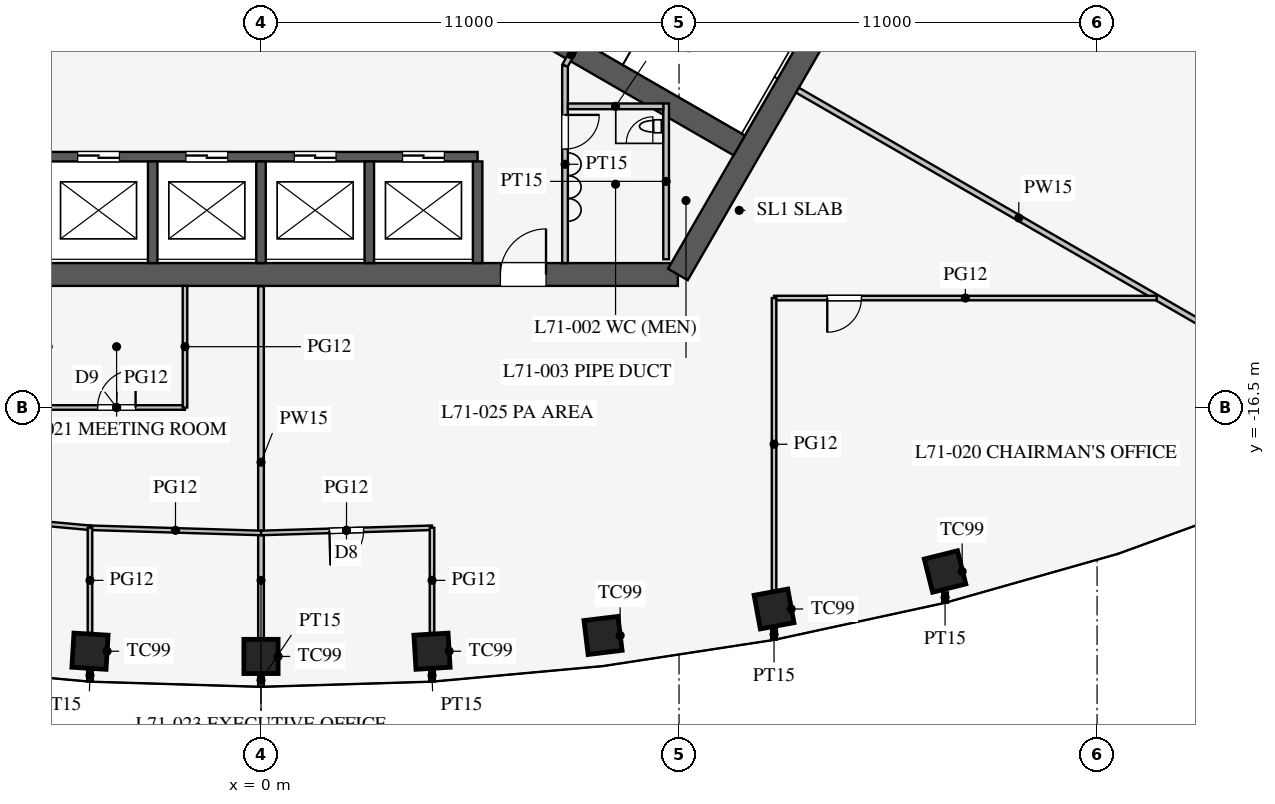
"""IFC4 building model, lengths in metres.
Left out: names, types, materials, properties, quantities, classifications, styles, units other than length and angle.
Written with IfcOpenShell. Run it as: python <this file> out.ifc"""

import sys

from ifc_helpers import new_model, si_unit, direction, frame, frame_2d, origin, origin_2d, place, context, subcontext, project, spatial, rectangle, extrude, element, fill, save


model = new_model("IFC4")
c1 = context("Model", 3, precision=1e-05, world=origin(), true_north=direction((0.0, 1.0)))
c2 = subcontext(c1, "Body", "Model", "MODEL_VIEW")
j1 = project(units=[si_unit("LENGTHUNIT", "METRE"), si_unit("PLANEANGLEUNIT", "RADIAN")], contexts=[c1])
p1 = place(None, origin())
s1 = spatial("IfcSite", under=j1, at=p1, CompositionType="ELEMENT")
p2 = place(p1, origin())
s2 = spatial("IfcBuilding", under=s1, at=p2, CompositionType="ELEMENT")
p3 = place(p2, frame((0.0, 0.0, 309.9)))
s3 = spatial("IfcBuildingStorey", under=s2, at=p3, CompositionType="ELEMENT", Elevation=309.9)
for number, where, z_axis, x_axis in (
    (1, (-4.5, -22.914, 0.0), (0.0, 0.0, 1.0), (0.998, -0.061, 0.0)),
    (2, (0.0, -23.052, 0.0), (0.0, 0.0, 1.0), (1.0, 0.0, 0.0)),
    (3, (4.5, -22.914, 0.0), (0.0, 0.0, 1.0), (0.998, 0.061, 0.0)),
    (4, (9.0, -22.499, 0.0), (0.0, 0.0, 1.0), (0.993, 0.121, 0.0)),
    (5, (13.5, -21.803, 0.0), (0.0, 0.0, 1.0), (0.983, 0.182, 0.0)),
    (6, (18.0, -20.816, 0.0), (0.0, 0.0, 1.0), (0.97, 0.242, 0.0)),
):
    element("IfcColumn", number, at=place(p3, frame(where, z_axis=z_axis, x_axis=x_axis)), inside=s3, PredefinedType="COLUMN", context=c2, shape_type="SweptSolid", body=[
        extrude(rectangle(XDim=0.9, YDim=0.9, at=origin_2d()), origin(), (0.0, 0.0, 1.0), 4.2),
    ])
p4 = place(p3, frame((-10.97, -13.0, 0.0), z_axis=(0.0, 0.0, 1.0), x_axis=(1.0, 0.0, 0.0)))
e7 = element("IfcWall", 7, at=p4, inside=s3, PredefinedType="SHEAR", context=c2, shape_type="SweptSolid", body=[
    extrude(rectangle(XDim=21.939, YDim=0.6, at=frame_2d((10.97, 0.0))), origin(), (0.0, 0.0, 1.0), 4.2),
])
p5 = place(p4, frame((17.27, 0.0, 0.0)))
e8 = element("IfcOpeningElement", 8, at=p5, cuts=e7, PredefinedType="OPENING", context=c2, shape_type="SweptSolid", body=[
    extrude(rectangle(XDim=1.2, YDim=2.1, at=frame_2d((0.6, 1.05))), frame((0.0, 0.31, 0.0), z_axis=(0.0, -1.0, 0.0), x_axis=(1.0, 0.0, 0.0)), (0.0, 0.0, 1.0), 0.62),
])
p6 = place(p4, frame((3.47, 0.0, 0.0)))
e9 = element("IfcOpeningElement", 9, at=p6, cuts=e7, PredefinedType="OPENING", context=c2, shape_type="SweptSolid", body=[
    extrude(rectangle(XDim=1.2, YDim=2.1, at=frame_2d((0.6, 1.05))), frame((0.0, 0.31, 0.0), z_axis=(0.0, -1.0, 0.0), x_axis=(1.0, 0.0, 0.0)), (0.0, 0.0, 1.0), 0.62),
])
p7 = place(p3, frame((10.97, -13.0, 0.0), z_axis=(0.0, 0.0, 1.0), x_axis=(0.499995765644, 0.866027848477, 0.0)))
e10 = element("IfcWall", 10, at=p7, inside=s3, PredefinedType="SHEAR", context=c2, shape_type="SweptSolid", body=[
    extrude(rectangle(XDim=11.547, YDim=0.6, at=frame_2d((5.773, 0.0))), origin(), (0.0, 0.0, 1.0), 4.2),
])
p8 = place(p3, frame((-5.7, -9.9, 0.0), z_axis=(0.0, 0.0, 1.0), x_axis=(1.0, 0.0, 0.0)))
e11 = element("IfcWall", 11, at=p8, inside=s3, PredefinedType="SHEAR", context=c2, shape_type="SweptSolid", body=[
    extrude(rectangle(XDim=11.4, YDim=0.25, at=frame_2d((5.7, 0.0))), origin(), (0.0, 0.0, 1.0), 4.2),
])
p9 = place(p8, frame((0.875, 0.0, 0.0)))
e12 = element("IfcOpeningElement", 12, at=p9, cuts=e11, PredefinedType="OPENING", context=c2, shape_type="SweptSolid", body=[
    extrude(rectangle(XDim=1.1, YDim=2.2, at=frame_2d((0.55, 1.1))), frame((0.0, 0.135, 0.0), z_axis=(0.0, -1.0, 0.0), x_axis=(1.0, 0.0, 0.0)), (0.0, 0.0, 1.0), 0.27),
])
p10 = place(p8, frame((3.725, 0.0, 0.0)))
e13 = element("IfcOpeningElement", 13, at=p10, cuts=e11, PredefinedType="OPENING", context=c2, shape_type="SweptSolid", body=[
    extrude(rectangle(XDim=1.1, YDim=2.2, at=frame_2d((0.55, 1.1))), frame((0.0, 0.135, 0.0), z_axis=(0.0, -1.0, 0.0), x_axis=(1.0, 0.0, 0.0)), (0.0, 0.0, 1.0), 0.27),
])
p11 = place(p8, frame((6.575, 0.0, 0.0)))
e14 = element("IfcOpeningElement", 14, at=p11, cuts=e11, PredefinedType="OPENING", context=c2, shape_type="SweptSolid", body=[
    extrude(rectangle(XDim=1.1, YDim=2.2, at=frame_2d((0.55, 1.1))), frame((0.0, 0.135, 0.0), z_axis=(0.0, -1.0, 0.0), x_axis=(1.0, 0.0, 0.0)), (0.0, 0.0, 1.0), 0.27),
])
p12 = place(p8, frame((9.425, 0.0, 0.0)))
e15 = element("IfcOpeningElement", 15, at=p12, cuts=e11, PredefinedType="OPENING", context=c2, shape_type="SweptSolid", body=[
    extrude(rectangle(XDim=1.1, YDim=2.2, at=frame_2d((0.55, 1.1))), frame((0.0, 0.135, 0.0), z_axis=(0.0, -1.0, 0.0), x_axis=(1.0, 0.0, 0.0)), (0.0, 0.0, 1.0), 0.27),
])
for number, where, z_axis, x_axis in (
    (16, (-2.85, -10.025, 0.0), (0.0, 0.0, 1.0), (0.0, -1.0, 0.0)),
    (17, (0.0, -10.025, 0.0), (0.0, 0.0, 1.0), (0.0, -1.0, 0.0)),
    (18, (2.85, -10.025, 0.0), (0.0, 0.0, 1.0), (0.0, -1.0, 0.0)),
    (19, (5.7, -10.025, 0.0), (0.0, 0.0, 1.0), (0.0, -1.0, 0.0)),
):
    element("IfcWall", number, at=place(p3, frame(where, z_axis=z_axis, x_axis=x_axis)), inside=s3, PredefinedType="SHEAR", context=c2, shape_type="SweptSolid", body=[
        extrude(rectangle(XDim=2.675, YDim=0.25, at=frame_2d((1.337, 0.0))), origin(), (0.0, 0.0, 1.0), 4.2),
    ])
for number, where, z_axis, x_axis in (
    (20, (4.638, -5.016, 0.0), (0.0, 0.0, 1.0), (0.866, -0.5, 0.0)),
    (21, (-4.638, -5.016, 0.0), (0.0, 0.0, 1.0), (-0.866, -0.5, 0.0)),
):
    element("IfcWall", number, at=place(p3, frame(where, z_axis=z_axis, x_axis=x_axis)), inside=s3, PredefinedType="SHEAR", context=c2, shape_type="SweptSolid", body=[
        extrude(rectangle(XDim=9.175, YDim=0.6, at=frame_2d((4.587, 0.0))), origin(), (0.0, 0.0, 1.0), 4.2),
    ])
p13 = place(p3, frame((8.0, -7.5, 0.0), z_axis=(0.0, 0.0, 1.0), x_axis=(0.0, -1.0, 0.0)))
e22 = element("IfcWall", 22, at=p13, inside=s3, PredefinedType="PARTITIONING", context=c2, shape_type="SweptSolid", body=[
    extrude(rectangle(XDim=5.2, YDim=0.15, at=frame_2d((2.6, 0.0))), origin(), (0.0, 0.0, 1.0), 4.0),
])
p14 = place(p13, frame((1.3, 0.0, 0.0)))
e23 = element("IfcOpeningElement", 23, at=p14, cuts=e22, PredefinedType="OPENING", context=c2, shape_type="SweptSolid", body=[
    extrude(rectangle(XDim=0.9, YDim=2.1, at=frame_2d((0.45, 1.05))), frame((0.0, 0.085, 0.0), z_axis=(0.0, -1.0, 0.0), x_axis=(1.0, 0.0, 0.0)), (0.0, 0.0, 1.0), 0.17),
])
p15 = place(p3, frame((8.0, -7.5, 0.0), z_axis=(0.0, 0.0, 1.0), x_axis=(0.499842556608, 0.866116284689, 0.0)))
e24 = element("IfcWall", 24, at=p15, inside=s3, PredefinedType="PARTITIONING", context=c2, shape_type="SweptSolid", body=[
    extrude(rectangle(XDim=0.645, YDim=0.15, at=frame_2d((0.323, 0.0))), origin(), (0.0, 0.0, 1.0), 4.0),
])
p16 = place(p3, frame((10.66, -8.5, 0.0), z_axis=(0.0, 0.0, 1.0), x_axis=(0.0, -1.0, 0.0)))
e25 = element("IfcWall", 25, at=p16, inside=s3, PredefinedType="PARTITIONING", context=c2, shape_type="SweptSolid", body=[
    extrude(rectangle(XDim=4.1, YDim=0.15, at=frame_2d((2.05, 0.0))), origin(), (0.0, 0.0, 1.0), 4.0),
])
p17 = place(p3, frame((8.075, -8.575, 0.0), z_axis=(0.0, 0.0, 1.0), x_axis=(1.0, 0.0, 0.0)))
e26 = element("IfcWall", 26, at=p17, inside=s3, PredefinedType="PARTITIONING", context=c2, shape_type="SweptSolid", body=[
    extrude(rectangle(XDim=2.51, YDim=0.15, at=frame_2d((1.255, 0.0))), origin(), (0.0, 0.0, 1.0), 4.0),
])
p18 = place(p3, frame((14.116, -8.15, 0.0), z_axis=(0.0, 0.0, 1.0), x_axis=(0.866020541135, -0.500008422262, 0.0)))
e27 = element("IfcWall", 27, at=p18, inside=s3, PredefinedType="PARTITIONING", context=c2, shape_type="SweptSolid", body=[
    extrude(rectangle(XDim=13.45, YDim=0.15, at=frame_2d((6.725, 0.0))), origin(), (0.0, 0.0, 1.0), 2.5),
])
p19 = place(p3, frame((13.5, -13.62, 0.0), z_axis=(0.0, 0.0, 1.0), x_axis=(1.0, 0.0, 0.0)))
e28 = element("IfcWall", 28, at=p19, inside=s3, PredefinedType="PARTITIONING", context=c2, shape_type="SweptSolid", body=[
    extrude(rectangle(XDim=10.07, YDim=0.12, at=frame_2d((5.035, 0.0))), origin(), (0.0, 0.0, 1.0), 2.9),
])
p20 = place(p19, frame((1.4, 0.0, 0.15)))
e29 = element("IfcOpeningElement", 29, at=p20, cuts=e28, PredefinedType="OPENING", context=c2, shape_type="SweptSolid", body=[
    extrude(rectangle(XDim=0.9, YDim=2.1, at=frame_2d((0.45, 1.05))), frame((0.0, 0.07, 0.0), z_axis=(0.0, -1.0, 0.0), x_axis=(1.0, 0.0, 0.0)), (0.0, 0.0, 1.0), 0.14),
])
p21 = place(p3, frame((0.0, -13.31, 0.0), z_axis=(0.0, 0.0, 1.0), x_axis=(0.0, -1.0, 0.0)))
e30 = element("IfcWall", 30, at=p21, inside=s3, PredefinedType="PARTITIONING", context=c2, shape_type="SweptSolid", body=[
    extrude(rectangle(XDim=9.261, YDim=0.15, at=frame_2d((4.631, 0.0))), origin(), (0.0, 0.0, 1.0), 3.3),
])
p22 = place(p3, frame((-5.6, -16.5, 0.0), z_axis=(0.0, 0.0, 1.0), x_axis=(1.0, 0.0, 0.0)))
e31 = element("IfcWall", 31, at=p22, inside=s3, PredefinedType="PARTITIONING", context=c2, shape_type="SweptSolid", body=[
    extrude(rectangle(XDim=3.6, YDim=0.12, at=frame_2d((1.8, 0.0))), origin(), (0.0, 0.0, 1.0), 2.9),
])
p23 = place(p22, frame((1.3, 0.0, 0.15)))
e32 = element("IfcOpeningElement", 32, at=p23, cuts=e31, PredefinedType="OPENING", context=c2, shape_type="SweptSolid", body=[
    extrude(rectangle(XDim=1.0, YDim=2.1, at=frame_2d((0.5, 1.05))), frame((0.0, 0.07, 0.0), z_axis=(0.0, -1.0, 0.0), x_axis=(1.0, 0.0, 0.0)), (0.0, 0.0, 1.0), 0.14),
])
p24 = place(p3, frame((-2.0, -13.3, 0.0), z_axis=(0.0, 0.0, 1.0), x_axis=(0.0, -1.0, 0.0)))
e33 = element("IfcWall", 33, at=p24, inside=s3, PredefinedType="PARTITIONING", context=c2, shape_type="SweptSolid", body=[
    extrude(rectangle(XDim=3.2, YDim=0.12, at=frame_2d((1.6, 0.0))), origin(), (0.0, 0.0, 1.0), 2.9),
])
p25 = place(p3, frame((13.5, -22.331, 0.0), z_axis=(0.0, 0.0, 1.0), x_axis=(0.0, -1.0, 0.0)))
e34 = element("IfcWall", 34, at=p25, inside=s3, PredefinedType="PARTITIONING", context=c2, shape_type="SweptSolid", body=[
    extrude(rectangle(XDim=0.28, YDim=0.15, at=frame_2d((0.14, 0.0))), origin(), (0.0, 0.0, 1.0), 2.9),
])
p26 = place(p3, frame((18.0, -21.366, 0.0), z_axis=(0.0, 0.0, 1.0), x_axis=(0.0, -1.0, 0.0)))
e35 = element("IfcWall", 35, at=p26, inside=s3, PredefinedType="PARTITIONING", context=c2, shape_type="SweptSolid", body=[
    extrude(rectangle(XDim=0.27, YDim=0.15, at=frame_2d((0.135, 0.0))), origin(), (0.0, 0.0, 1.0), 2.9),
])
p27 = place(p3, frame((4.5, -23.394, 0.0), z_axis=(0.0, 0.0, 1.0), x_axis=(0.0, -1.0, 0.0)))
e36 = element("IfcWall", 36, at=p27, inside=s3, PredefinedType="PARTITIONING", context=c2, shape_type="SweptSolid", body=[
    extrude(rectangle(XDim=0.316, YDim=0.15, at=frame_2d((0.158, 0.0))), origin(), (0.0, 0.0, 1.0), 2.9),
])
p28 = place(p3, frame((0.0, -23.506, 0.0), z_axis=(0.0, 0.0, 1.0), x_axis=(0.0, -1.0, 0.0)))
e37 = element("IfcWall", 37, at=p28, inside=s3, PredefinedType="PARTITIONING", context=c2, shape_type="SweptSolid", body=[
    extrude(rectangle(XDim=0.341, YDim=0.15, at=frame_2d((0.17, 0.0))), origin(), (0.0, 0.0, 1.0), 2.9),
])
p29 = place(p3, frame((-4.5, -23.394, 0.0), z_axis=(0.0, 0.0, 1.0), x_axis=(0.0, -1.0, 0.0)))
e38 = element("IfcWall", 38, at=p29, inside=s3, PredefinedType="PARTITIONING", context=c2, shape_type="SweptSolid", body=[
    extrude(rectangle(XDim=0.316, YDim=0.15, at=frame_2d((0.158, 0.0))), origin(), (0.0, 0.0, 1.0), 2.9),
])
p30 = place(p3, frame((0.0, -19.802, 0.0), z_axis=(0.0, 0.0, 1.0), x_axis=(0.999542074227, 0.030259574513, 0.0)))
e39 = element("IfcWall", 39, at=p30, inside=s3, PredefinedType="PARTITIONING", context=c2, shape_type="SweptSolid", body=[
    extrude(rectangle(XDim=4.502, YDim=0.12, at=frame_2d((2.251, 0.0))), origin(), (0.0, 0.0, 1.0), 2.9),
])
p31 = place(p30, frame((1.8, 0.0, 0.15)))
e40 = element("IfcOpeningElement", 40, at=p31, cuts=e39, PredefinedType="OPENING", context=c2, shape_type="SweptSolid", body=[
    extrude(rectangle(XDim=0.9, YDim=2.1, at=frame_2d((0.45, 1.05))), frame((0.0, 0.07, 0.0), z_axis=(0.0, -1.0, 0.0), x_axis=(1.0, 0.0, 0.0)), (0.0, 0.0, 1.0), 0.14),
])
p32 = place(p3, frame((-4.5, -19.665, 0.0), z_axis=(0.0, 0.0, 1.0), x_axis=(0.999542074227, -0.030259574513, 0.0)))
e41 = element("IfcWall", 41, at=p32, inside=s3, PredefinedType="PARTITIONING", context=c2, shape_type="SweptSolid", body=[
    extrude(rectangle(XDim=4.502, YDim=0.12, at=frame_2d((2.251, 0.0))), origin(), (0.0, 0.0, 1.0), 2.9),
])
p33 = place(p3, frame((-9.0, -19.255, 0.0), z_axis=(0.0, 0.0, 1.0), x_axis=(0.995871921504, -0.090769576179, 0.0)))
e42 = element("IfcWall", 42, at=p33, inside=s3, PredefinedType="PARTITIONING", context=c2, shape_type="SweptSolid", body=[
    extrude(rectangle(XDim=4.519, YDim=0.12, at=frame_2d((2.259, 0.0))), origin(), (0.0, 0.0, 1.0), 2.9),
])
p34 = place(p33, frame((1.8, 0.0, 0.15)))
e43 = element("IfcOpeningElement", 43, at=p34, cuts=e42, PredefinedType="OPENING", context=c2, shape_type="SweptSolid", body=[
    extrude(rectangle(XDim=0.9, YDim=2.1, at=frame_2d((0.45, 1.05))), frame((0.0, 0.07, 0.0), z_axis=(0.0, -1.0, 0.0), x_axis=(1.0, 0.0, 0.0)), (0.0, 0.0, 1.0), 0.14),
])
p35 = place(p3, frame((13.5, -13.62, 0.0), z_axis=(0.0, 0.0, 1.0), x_axis=(0.0, -1.0, 0.0)))
e44 = element("IfcWall", 44, at=p35, inside=s3, PredefinedType="PARTITIONING", context=c2, shape_type="SweptSolid", body=[
    extrude(rectangle(XDim=7.695, YDim=0.12, at=frame_2d((3.847, 0.0))), origin(), (0.0, 0.0, 1.0), 2.9),
])
for number, where, z_axis, x_axis in (
    (45, (4.5, -19.665, 0.0), (0.0, 0.0, 1.0), (0.0, -1.0, 0.0)),
    (46, (-4.5, -19.665, 0.0), (0.0, 0.0, 1.0), (0.0, -1.0, 0.0)),
):
    element("IfcWall", number, at=place(p3, frame(where, z_axis=z_axis, x_axis=x_axis)), inside=s3, PredefinedType="PARTITIONING", context=c2, shape_type="SweptSolid", body=[
        extrude(rectangle(XDim=2.768, YDim=0.12, at=frame_2d((1.384, 0.0))), origin(), (0.0, 0.0, 1.0), 2.9),
    ])
p36 = place(p3, frame((-0.29, 29.818, 0.0), z_axis=(0.0, 0.0, 1.0), x_axis=(-0.500000361757, -0.866025194924, 0.0)))
e47 = element("IfcWall", 47, at=p36, inside=s3, PredefinedType="PARTITIONING", context=c2, shape_type="SweptSolid", body=[
    extrude(rectangle(XDim=51.355, YDim=0.12, at=frame_2d((25.678, 0.0))), origin(), (0.0, 0.0, 1.0), 2.9),
])
p37 = place(p36, frame((9.9, 0.0, 0.15)))
e48 = element("IfcOpeningElement", 48, at=p37, cuts=e47, PredefinedType="OPENING", context=c2, shape_type="SweptSolid", body=[
    extrude(rectangle(XDim=1.8, YDim=2.1, at=frame_2d((0.9, 1.05))), frame((0.0, 0.07, 0.0), z_axis=(0.0, -1.0, 0.0), x_axis=(1.0, 0.0, 0.0)), (0.0, 0.0, 1.0), 0.14),
])
p38 = place(p36, frame((39.65, 0.0, 0.15)))
e49 = element("IfcOpeningElement", 49, at=p38, cuts=e47, PredefinedType="OPENING", context=c2, shape_type="SweptSolid", body=[
    extrude(rectangle(XDim=1.8, YDim=2.1, at=frame_2d((0.9, 1.05))), frame((0.0, 0.07, 0.0), z_axis=(0.0, -1.0, 0.0), x_axis=(1.0, 0.0, 0.0)), (0.0, 0.0, 1.0), 0.14),
])
p39 = place(p14, origin())
e50 = element("IfcDoor", 50, at=p39, inside=s3, OperationType="SINGLE_SWING_LEFT", PredefinedType="DOOR", context=c2, shape_type="SweptSolid", body=[
    extrude(rectangle(XDim=0.9, YDim=2.1, at=frame_2d((0.45, 1.05))), frame((0.0, 0.025, 0.0), z_axis=(0.0, -1.0, 0.0), x_axis=(1.0, 0.0, 0.0)), (0.0, 0.0, 1.0), 0.05),
])
fill(e23, e50)
p40 = place(p5, origin())
e51 = element("IfcDoor", 51, at=p40, inside=s3, OperationType="SINGLE_SWING_RIGHT", PredefinedType="DOOR", context=c2, shape_type="SweptSolid", body=[
    extrude(rectangle(XDim=1.2, YDim=2.1, at=frame_2d((0.6, 1.05))), frame((0.0, 0.025, 0.0), z_axis=(0.0, -1.0, 0.0), x_axis=(1.0, 0.0, 0.0)), (0.0, 0.0, 1.0), 0.05),
])
fill(e8, e51)
p41 = place(p20, frame((0.9, 0.0, 0.0), z_axis=(0.0, 0.0, 1.0), x_axis=(-1.0, 0.0, 0.0)))
e52 = element("IfcDoor", 52, at=p41, inside=s3, OperationType="SINGLE_SWING_RIGHT", PredefinedType="DOOR", context=c2, shape_type="SweptSolid", body=[
    extrude(rectangle(XDim=0.9, YDim=2.1, at=frame_2d((0.45, 1.05))), frame((0.0, 0.025, 0.0), z_axis=(0.0, -1.0, 0.0), x_axis=(1.0, 0.0, 0.0)), (0.0, 0.0, 1.0), 0.05),
])
fill(e29, e52)
p42 = place(p23, origin())
e53 = element("IfcDoor", 53, at=p42, inside=s3, OperationType="SINGLE_SWING_RIGHT", PredefinedType="DOOR", context=c2, shape_type="SweptSolid", body=[
    extrude(rectangle(XDim=1.0, YDim=2.1, at=frame_2d((0.5, 1.05))), frame((0.0, 0.025, 0.0), z_axis=(0.0, -1.0, 0.0), x_axis=(1.0, 0.0, 0.0)), (0.0, 0.0, 1.0), 0.05),
])
fill(e32, e53)
p43 = place(p31, frame((0.9, 0.0, 0.0), z_axis=(0.0, 0.0, 1.0), x_axis=(-1.0, 0.0, 0.0)))
e54 = element("IfcDoor", 54, at=p43, inside=s3, OperationType="SINGLE_SWING_RIGHT", PredefinedType="DOOR", context=c2, shape_type="SweptSolid", body=[
    extrude(rectangle(XDim=0.9, YDim=2.1, at=frame_2d((0.45, 1.05))), frame((0.0, 0.025, 0.0), z_axis=(0.0, -1.0, 0.0), x_axis=(1.0, 0.0, 0.0)), (0.0, 0.0, 1.0), 0.05),
])
fill(e40, e54)
p44 = place(p9, origin())
e55 = element("IfcDoor", 55, at=p44, inside=s3, OperationType="DOUBLE_DOOR_SLIDING", PredefinedType="DOOR", context=c2, shape_type="SweptSolid", body=[
    extrude(rectangle(XDim=1.1, YDim=2.2, at=frame_2d((0.55, 1.1))), frame((0.0, 0.025, 0.0), z_axis=(0.0, -1.0, 0.0), x_axis=(1.0, 0.0, 0.0)), (0.0, 0.0, 1.0), 0.05),
])
fill(e12, e55)
p45 = place(p10, origin())
e56 = element("IfcDoor", 56, at=p45, inside=s3, OperationType="DOUBLE_DOOR_SLIDING", PredefinedType="DOOR", context=c2, shape_type="SweptSolid", body=[
    extrude(rectangle(XDim=1.1, YDim=2.2, at=frame_2d((0.55, 1.1))), frame((0.0, 0.025, 0.0), z_axis=(0.0, -1.0, 0.0), x_axis=(1.0, 0.0, 0.0)), (0.0, 0.0, 1.0), 0.05),
])
fill(e13, e56)
p46 = place(p11, origin())
e57 = element("IfcDoor", 57, at=p46, inside=s3, OperationType="DOUBLE_DOOR_SLIDING", PredefinedType="DOOR", context=c2, shape_type="SweptSolid", body=[
    extrude(rectangle(XDim=1.1, YDim=2.2, at=frame_2d((0.55, 1.1))), frame((0.0, 0.025, 0.0), z_axis=(0.0, -1.0, 0.0), x_axis=(1.0, 0.0, 0.0)), (0.0, 0.0, 1.0), 0.05),
])
fill(e14, e57)
p47 = place(p12, origin())
e58 = element("IfcDoor", 58, at=p47, inside=s3, OperationType="DOUBLE_DOOR_SLIDING", PredefinedType="DOOR", context=c2, shape_type="SweptSolid", body=[
    extrude(rectangle(XDim=1.1, YDim=2.2, at=frame_2d((0.55, 1.1))), frame((0.0, 0.025, 0.0), z_axis=(0.0, -1.0, 0.0), x_axis=(1.0, 0.0, 0.0)), (0.0, 0.0, 1.0), 0.05),
])
fill(e15, e58)
save(model, sys.argv[1])
